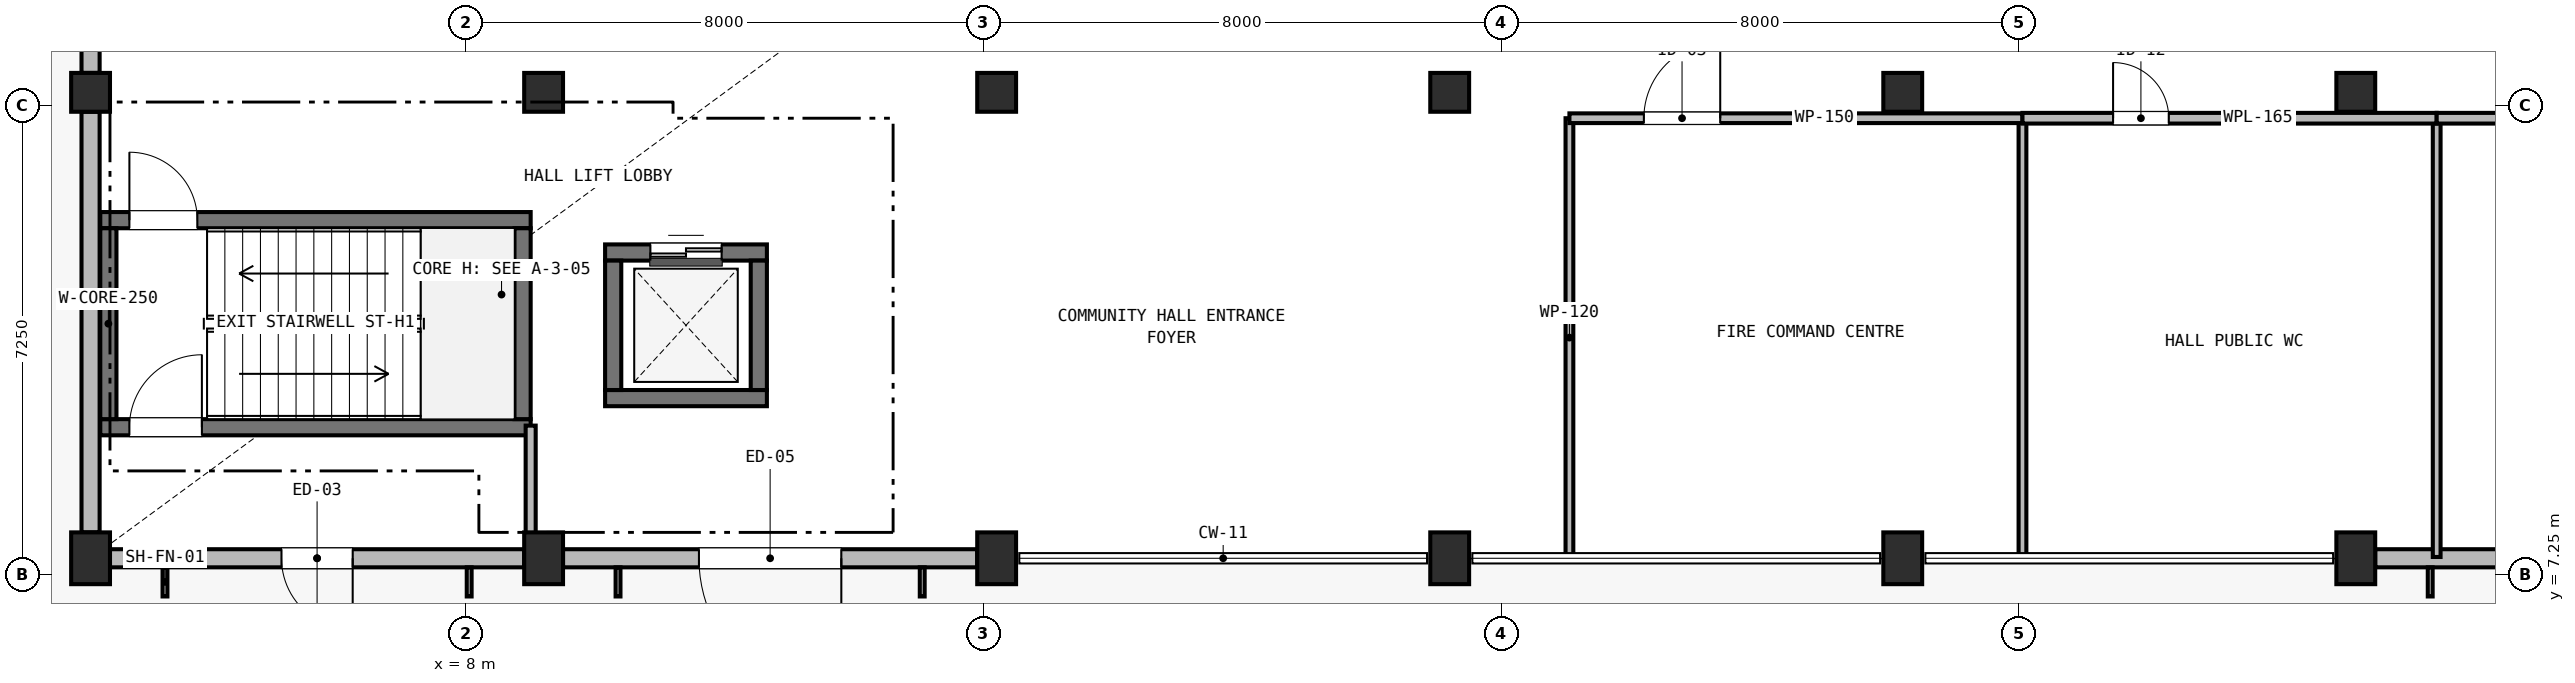
"""IFC4 building model, lengths in metres.
Left out: names, types, materials, properties, quantities, classifications, styles, units other than length and angle.
Written with IfcOpenShell. Run it as: python <this file> out.ifc"""

import sys

from ifc_helpers import new_model, si_unit, direction, frame, frame_2d, origin, origin_2d, place, context, subcontext, project, spatial, rectangle, circle, extrude, element, fill, save


model = new_model("IFC4")
c1 = context("Model", 3, precision=1e-05, world=origin(), true_north=direction((0.0, 1.0)))
c2 = subcontext(c1, "Body", "Model", "MODEL_VIEW")
j1 = project(units=[si_unit("LENGTHUNIT", "METRE"), si_unit("PLANEANGLEUNIT", "RADIAN")], contexts=[c1])
p1 = place(None, origin())
s1 = spatial("IfcSite", under=j1, at=p1, CompositionType="ELEMENT")
p2 = place(p1, origin())
s2 = spatial("IfcBuilding", under=s1, at=p2, CompositionType="ELEMENT")
p3 = place(p2, origin())
s3 = spatial("IfcBuildingStorey", under=s2, at=p3, CompositionType="ELEMENT", Elevation=0.0)
p4 = place(p3, frame((2.2, 7.5, -0.35), z_axis=(0.0, 0.0, 1.0), x_axis=(1.0, 0.0, 0.0)))
e1 = element("IfcColumn", 1, at=p4, inside=s3, PredefinedType="COLUMN", context=c2, shape_type="SweptSolid", body=[
    extrude(rectangle(XDim=0.6, YDim=0.8, at=origin_2d()), origin(), (0.0, 0.0, 1.0), 4.85),
])
p5 = place(p3, frame((2.2, 14.7, -0.35), z_axis=(0.0, 0.0, 1.0), x_axis=(1.0, 0.0, 0.0)))
e2 = element("IfcColumn", 2, at=p5, inside=s3, PredefinedType="COLUMN", context=c2, shape_type="SweptSolid", body=[
    extrude(circle(Radius=0.3, at=origin_2d()), origin(), (0.0, 0.0, 1.0), 4.55),
])
p6 = place(p3, frame((9.2, 7.5, -0.35), z_axis=(0.0, 0.0, 1.0), x_axis=(1.0, 0.0, 0.0)))
e3 = element("IfcColumn", 3, at=p6, inside=s3, PredefinedType="COLUMN", context=c2, shape_type="SweptSolid", body=[
    extrude(rectangle(XDim=0.6, YDim=0.8, at=origin_2d()), origin(), (0.0, 0.0, 1.0), 4.85),
])
p7 = place(p3, frame((9.2, 14.7, -0.35), z_axis=(0.0, 0.0, 1.0), x_axis=(1.0, 0.0, 0.0)))
e4 = element("IfcColumn", 4, at=p7, inside=s3, PredefinedType="COLUMN", context=c2, shape_type="SweptSolid", body=[
    extrude(circle(Radius=0.3, at=origin_2d()), origin(), (0.0, 0.0, 1.0), 4.55),
])
p8 = place(p3, frame((16.2, 7.5, -0.35), z_axis=(0.0, 0.0, 1.0), x_axis=(1.0, 0.0, 0.0)))
e5 = element("IfcColumn", 5, at=p8, inside=s3, PredefinedType="COLUMN", context=c2, shape_type="SweptSolid", body=[
    extrude(rectangle(XDim=0.6, YDim=0.8, at=origin_2d()), origin(), (0.0, 0.0, 1.0), 4.85),
])
p9 = place(p3, frame((16.2, 14.7, -0.35), z_axis=(0.0, 0.0, 1.0), x_axis=(1.0, 0.0, 0.0)))
e6 = element("IfcColumn", 6, at=p9, inside=s3, PredefinedType="COLUMN", context=c2, shape_type="SweptSolid", body=[
    extrude(circle(Radius=0.3, at=origin_2d()), origin(), (0.0, 0.0, 1.0), 4.55),
])
p10 = place(p3, frame((23.2, 7.5, -0.35), z_axis=(0.0, 0.0, 1.0), x_axis=(1.0, 0.0, 0.0)))
e7 = element("IfcColumn", 7, at=p10, inside=s3, PredefinedType="COLUMN", context=c2, shape_type="SweptSolid", body=[
    extrude(rectangle(XDim=0.6, YDim=0.8, at=origin_2d()), origin(), (0.0, 0.0, 1.0), 4.85),
])
p11 = place(p3, frame((23.2, 14.7, -0.35), z_axis=(0.0, 0.0, 1.0), x_axis=(1.0, 0.0, 0.0)))
e8 = element("IfcColumn", 8, at=p11, inside=s3, PredefinedType="COLUMN", context=c2, shape_type="SweptSolid", body=[
    extrude(circle(Radius=0.3, at=origin_2d()), origin(), (0.0, 0.0, 1.0), 4.55),
])
p12 = place(p3, frame((30.2, 7.5, -0.35), z_axis=(0.0, 0.0, 1.0), x_axis=(1.0, 0.0, 0.0)))
e9 = element("IfcColumn", 9, at=p12, inside=s3, PredefinedType="COLUMN", context=c2, shape_type="SweptSolid", body=[
    extrude(rectangle(XDim=0.6, YDim=0.8, at=origin_2d()), origin(), (0.0, 0.0, 1.0), 4.85),
])
p13 = place(p3, frame((30.2, 14.7, -0.35), z_axis=(0.0, 0.0, 1.0), x_axis=(1.0, 0.0, 0.0)))
e10 = element("IfcColumn", 10, at=p13, inside=s3, PredefinedType="COLUMN", context=c2, shape_type="SweptSolid", body=[
    extrude(circle(Radius=0.3, at=origin_2d()), origin(), (0.0, 0.0, 1.0), 4.55),
])
p14 = place(p3, frame((37.2, 7.5, -0.35), z_axis=(0.0, 0.0, 1.0), x_axis=(1.0, 0.0, 0.0)))
e11 = element("IfcColumn", 11, at=p14, inside=s3, PredefinedType="COLUMN", context=c2, shape_type="SweptSolid", body=[
    extrude(rectangle(XDim=0.6, YDim=0.8, at=origin_2d()), origin(), (0.0, 0.0, 1.0), 4.85),
])
p15 = place(p3, frame((37.2, 14.7, -0.35), z_axis=(0.0, 0.0, 1.0), x_axis=(1.0, 0.0, 0.0)))
e12 = element("IfcColumn", 12, at=p15, inside=s3, PredefinedType="COLUMN", context=c2, shape_type="SweptSolid", body=[
    extrude(circle(Radius=0.3, at=origin_2d()), origin(), (0.0, 0.0, 1.0), 4.55),
])
p16 = place(p3, frame((2.35, 12.725, -0.35), z_axis=(0.0, 0.0, 1.0), x_axis=(1.0, 0.0, 0.0)))
e13 = element("IfcWall", 13, at=p16, inside=s3, PredefinedType="SHEAR", context=c2, shape_type="SweptSolid", body=[
    extrude(rectangle(XDim=6.65, YDim=0.25, at=frame_2d((3.325, 0.0))), origin(), (0.0, 0.0, 1.0), 4.85),
])
p17 = place(p16, frame((0.45, 0.0, 0.35)))
e14 = element("IfcOpeningElement", 14, at=p17, cuts=e13, PredefinedType="OPENING", context=c2, shape_type="SweptSolid", body=[
    extrude(rectangle(XDim=1.05, YDim=2.15, at=frame_2d((0.525, 1.075))), frame((0.0, 0.14, 0.0), z_axis=(0.0, -1.0, 0.0), x_axis=(1.0, 0.0, 0.0)), (0.0, 0.0, 1.0), 0.28),
])
p18 = place(p3, frame((2.35, 9.525, -0.35), z_axis=(0.0, 0.0, 1.0), x_axis=(1.0, 0.0, 0.0)))
e15 = element("IfcWall", 15, at=p18, inside=s3, PredefinedType="SHEAR", context=c2, shape_type="SweptSolid", body=[
    extrude(rectangle(XDim=6.65, YDim=0.25, at=frame_2d((3.325, 0.0))), origin(), (0.0, 0.0, 1.0), 4.85),
])
p19 = place(p18, frame((0.45, 0.0, 0.35)))
e16 = element("IfcOpeningElement", 16, at=p19, cuts=e15, PredefinedType="OPENING", context=c2, shape_type="SweptSolid", body=[
    extrude(rectangle(XDim=1.12, YDim=2.15, at=frame_2d((0.56, 1.075))), frame((0.0, 0.14, 0.0), z_axis=(0.0, -1.0, 0.0), x_axis=(1.0, 0.0, 0.0)), (0.0, 0.0, 1.0), 0.28),
])
for number, where, z_axis, x_axis in (
    (17, (2.475, 9.65, -0.35), (0.0, 0.0, 1.0), (0.0, 1.0, 0.0)),
    (18, (8.875, 9.65, -0.35), (0.0, 0.0, 1.0), (0.0, 1.0, 0.0)),
):
    element("IfcWall", number, at=place(p3, frame(where, z_axis=z_axis, x_axis=x_axis)), inside=s3, PredefinedType="SHEAR", context=c2, shape_type="SweptSolid", body=[
        extrude(rectangle(XDim=2.95, YDim=0.25, at=frame_2d((1.475, 0.0))), origin(), (0.0, 0.0, 1.0), 4.85),
    ])
p20 = place(p3, frame((10.15, 12.225, -0.35), z_axis=(0.0, 0.0, 1.0), x_axis=(1.0, 0.0, 0.0)))
e19 = element("IfcWall", 19, at=p20, inside=s3, PredefinedType="SHEAR", context=c2, shape_type="SweptSolid", body=[
    extrude(rectangle(XDim=2.5, YDim=0.25, at=frame_2d((1.25, 0.0))), origin(), (0.0, 0.0, 1.0), 4.85),
])
p21 = place(p20, frame((0.7, 0.0, 0.35)))
e20 = element("IfcOpeningElement", 20, at=p21, cuts=e19, PredefinedType="OPENING", context=c2, shape_type="SweptSolid", body=[
    extrude(rectangle(XDim=1.1, YDim=2.15, at=frame_2d((0.55, 1.075))), frame((0.0, 0.14, 0.0), z_axis=(0.0, -1.0, 0.0), x_axis=(1.0, 0.0, 0.0)), (0.0, 0.0, 1.0), 0.28),
])
p22 = place(p3, frame((10.15, 9.975, -0.35), z_axis=(0.0, 0.0, 1.0), x_axis=(1.0, 0.0, 0.0)))
e21 = element("IfcWall", 21, at=p22, inside=s3, PredefinedType="SHEAR", context=c2, shape_type="SweptSolid", body=[
    extrude(rectangle(XDim=2.5, YDim=0.25, at=frame_2d((1.25, 0.0))), origin(), (0.0, 0.0, 1.0), 4.85),
])
for number, where, z_axis, x_axis in (
    (22, (10.275, 10.1, -0.35), (0.0, 0.0, 1.0), (0.0, 1.0, 0.0)),
    (23, (12.525, 10.1, -0.35), (0.0, 0.0, 1.0), (0.0, 1.0, 0.0)),
):
    element("IfcWall", number, at=place(p3, frame(where, z_axis=z_axis, x_axis=x_axis)), inside=s3, PredefinedType="SHEAR", context=c2, shape_type="SweptSolid", body=[
        extrude(rectangle(XDim=2.0, YDim=0.25, at=frame_2d((1.0, 0.0))), origin(), (0.0, 0.0, 1.0), 4.85),
    ])
p23 = place(p3, frame((8.9, 7.5, 0.0), z_axis=(0.0, 0.0, 1.0), x_axis=(-1.0, 0.0, 0.0)))
e24 = element("IfcWall", 24, at=p23, inside=s3, PredefinedType="SOLIDWALL", context=c2, shape_type="SweptSolid", body=[
    extrude(rectangle(XDim=6.4, YDim=0.28, at=frame_2d((3.2, 0.0))), origin(), (0.0, 0.0, 1.0), 3.65),
])
p24 = place(p23, frame((2.65, 0.0, 0.0)))
e25 = element("IfcOpeningElement", 25, at=p24, cuts=e24, PredefinedType="OPENING", context=c2, shape_type="SweptSolid", body=[
    extrude(rectangle(XDim=1.1, YDim=2.15, at=frame_2d((0.55, 1.075))), frame((0.0, 0.155, 0.0), z_axis=(0.0, -1.0, 0.0), x_axis=(1.0, 0.0, 0.0)), (0.0, 0.0, 1.0), 0.31),
])
p25 = place(p3, frame((15.9, 7.5, 0.0), z_axis=(0.0, 0.0, 1.0), x_axis=(-1.0, 0.0, 0.0)))
e26 = element("IfcWall", 26, at=p25, inside=s3, PredefinedType="SOLIDWALL", context=c2, shape_type="SweptSolid", body=[
    extrude(rectangle(XDim=6.4, YDim=0.28, at=frame_2d((3.2, 0.0))), origin(), (0.0, 0.0, 1.0), 3.65),
])
p26 = place(p25, frame((2.1, 0.0, 0.0)))
e27 = element("IfcOpeningElement", 27, at=p26, cuts=e26, PredefinedType="OPENING", context=c2, shape_type="SweptSolid", body=[
    extrude(rectangle(XDim=2.2, YDim=2.5, at=frame_2d((1.1, 1.25))), frame((0.0, 0.155, 0.0), z_axis=(0.0, -1.0, 0.0), x_axis=(1.0, 0.0, 0.0)), (0.0, 0.0, 1.0), 0.31),
])
p27 = place(p3, frame((43.9, 7.5, 0.0), z_axis=(0.0, 0.0, 1.0), x_axis=(-1.0, 0.0, 0.0)))
e28 = element("IfcWall", 28, at=p27, inside=s3, PredefinedType="SOLIDWALL", context=c2, shape_type="SweptSolid", body=[
    extrude(rectangle(XDim=6.4, YDim=0.28, at=frame_2d((3.2, 0.0))), origin(), (0.0, 0.0, 1.0), 3.65),
])
p28 = place(p27, frame((2.1, 0.0, 0.0)))
e29 = element("IfcOpeningElement", 29, at=p28, cuts=e28, PredefinedType="OPENING", context=c2, shape_type="SweptSolid", body=[
    extrude(rectangle(XDim=2.2, YDim=2.5, at=frame_2d((1.1, 1.25))), frame((0.0, 0.155, 0.0), z_axis=(0.0, -1.0, 0.0), x_axis=(1.0, 0.0, 0.0)), (0.0, 0.0, 1.0), 0.31),
])
p29 = place(p3, frame((2.2, 7.9, 0.0), z_axis=(0.0, 0.0, 1.0), x_axis=(0.0, 1.0, 0.0)))
e30 = element("IfcWall", 30, at=p29, inside=s3, PredefinedType="SOLIDWALL", context=c2, shape_type="SweptSolid", body=[
    extrude(rectangle(XDim=6.5, YDim=0.28, at=frame_2d((3.25, 0.0))), origin(), (0.0, 0.0, 1.0), 3.65),
])
p30 = place(p3, frame((2.2, 15.0, 0.0), z_axis=(0.0, 0.0, 1.0), x_axis=(0.0, 1.0, 0.0)))
e31 = element("IfcWall", 31, at=p30, inside=s3, PredefinedType="SOLIDWALL", context=c2, shape_type="SweptSolid", body=[
    extrude(rectangle(XDim=28.1, YDim=0.28, at=frame_2d((14.05, 0.0))), origin(), (0.0, 0.0, 1.0), 7.38),
])
p31 = place(p30, frame((8.0, 0.0, 0.0)))
e32 = element("IfcOpeningElement", 32, at=p31, cuts=e31, PredefinedType="OPENING", context=c2, shape_type="SweptSolid", body=[
    extrude(rectangle(XDim=3.8, YDim=2.85, at=frame_2d((1.9, 1.425))), frame((0.0, 0.155, 0.0), z_axis=(0.0, -1.0, 0.0), x_axis=(1.0, 0.0, 0.0)), (0.0, 0.0, 1.0), 0.31),
])
p32 = place(p30, frame((2.2, 0.0, 3.2)))
e33 = element("IfcOpeningElement", 33, at=p32, cuts=e31, PredefinedType="OPENING", context=c2, shape_type="SweptSolid", body=[
    extrude(rectangle(XDim=0.64, YDim=2.18, at=frame_2d((0.32, 1.09))), frame((0.0, 0.155, 0.0), z_axis=(0.0, -1.0, 0.0), x_axis=(1.0, 0.0, 0.0)), (0.0, 0.0, 1.0), 0.31),
])
p33 = place(p30, frame((5.2, 0.0, 3.2)))
e34 = element("IfcOpeningElement", 34, at=p33, cuts=e31, PredefinedType="OPENING", context=c2, shape_type="SweptSolid", body=[
    extrude(rectangle(XDim=0.7, YDim=2.36, at=frame_2d((0.35, 1.18))), frame((0.0, 0.155, 0.0), z_axis=(0.0, -1.0, 0.0), x_axis=(1.0, 0.0, 0.0)), (0.0, 0.0, 1.0), 0.31),
])
p34 = place(p30, frame((14.5, 0.0, 3.2)))
e35 = element("IfcOpeningElement", 35, at=p34, cuts=e31, PredefinedType="OPENING", context=c2, shape_type="SweptSolid", body=[
    extrude(rectangle(XDim=0.76, YDim=2.34, at=frame_2d((0.38, 1.17))), frame((0.0, 0.155, 0.0), z_axis=(0.0, -1.0, 0.0), x_axis=(1.0, 0.0, 0.0)), (0.0, 0.0, 1.0), 0.31),
])
p35 = place(p30, frame((19.0, 0.0, 3.2)))
e36 = element("IfcOpeningElement", 36, at=p35, cuts=e31, PredefinedType="OPENING", context=c2, shape_type="SweptSolid", body=[
    extrude(rectangle(XDim=0.82, YDim=2.18, at=frame_2d((0.41, 1.09))), frame((0.0, 0.155, 0.0), z_axis=(0.0, -1.0, 0.0), x_axis=(1.0, 0.0, 0.0)), (0.0, 0.0, 1.0), 0.31),
])
p36 = place(p30, frame((23.5, 0.0, 3.2)))
e37 = element("IfcOpeningElement", 37, at=p36, cuts=e31, PredefinedType="OPENING", context=c2, shape_type="SweptSolid", body=[
    extrude(rectangle(XDim=0.58, YDim=2.16, at=frame_2d((0.29, 1.08))), frame((0.0, 0.155, 0.0), z_axis=(0.0, -1.0, 0.0), x_axis=(1.0, 0.0, 0.0)), (0.0, 0.0, 1.0), 0.31),
])
p37 = place(p3, frame((9.0, 7.65, 0.0), z_axis=(0.0, 0.0, 1.0), x_axis=(0.0, 1.0, 0.0)))
e38 = element("IfcWall", 38, at=p37, inside=s3, PredefinedType="PARTITIONING", context=c2, shape_type="SweptSolid", body=[
    extrude(rectangle(XDim=1.9, YDim=0.155, at=frame_2d((0.95, 0.0))), origin(), (0.0, 0.0, 1.0), 3.667),
])
for number, where, z_axis, x_axis in (
    (39, (25.05, 7.52, 0.0), (0.0, 0.0, 1.0), (0.0, 1.0, 0.0)),
    (40, (32.05, 7.52, 0.0), (0.0, 0.0, 1.0), (0.0, 1.0, 0.0)),
    (41, (38.45, 7.52, 0.0), (0.0, 0.0, 1.0), (0.0, 1.0, 0.0)),
):
    element("IfcWall", number, at=place(p3, frame(where, z_axis=z_axis, x_axis=x_axis)), inside=s3, PredefinedType="PARTITIONING", context=c2, shape_type="SweptSolid", body=[
        extrude(rectangle(XDim=6.78, YDim=0.12, at=frame_2d((3.39, 0.0))), origin(), (0.0, 0.0, 1.0), 4.18),
    ])
p38 = place(p3, frame((25.05, 14.3, 0.0), z_axis=(0.0, 0.0, 1.0), x_axis=(1.0, 0.0, 0.0)))
e42 = element("IfcWall", 42, at=p38, inside=s3, PredefinedType="PARTITIONING", context=c2, shape_type="SweptSolid", body=[
    extrude(rectangle(XDim=7.0, YDim=0.15, at=frame_2d((3.5, 0.0))), origin(), (0.0, 0.0, 1.0), 4.18),
])
p39 = place(p38, frame((1.15, 0.0, 0.0)))
e43 = element("IfcOpeningElement", 43, at=p39, cuts=e42, PredefinedType="OPENING", context=c2, shape_type="SweptSolid", body=[
    extrude(rectangle(XDim=1.18, YDim=2.15, at=frame_2d((0.59, 1.075))), frame((0.0, 0.09, 0.0), z_axis=(0.0, -1.0, 0.0), x_axis=(1.0, 0.0, 0.0)), (0.0, 0.0, 1.0), 0.18),
])
p40 = place(p3, frame((32.05, 14.3, 0.0), z_axis=(0.0, 0.0, 1.0), x_axis=(1.0, 0.0, 0.0)))
e44 = element("IfcWall", 44, at=p40, inside=s3, PredefinedType="PLUMBINGWALL", context=c2, shape_type="SweptSolid", body=[
    extrude(rectangle(XDim=6.4, YDim=0.165, at=frame_2d((3.2, 0.0))), origin(), (0.0, 0.0, 1.0), 4.18),
])
p41 = place(p40, frame((1.4, 0.0, 0.0)))
e45 = element("IfcOpeningElement", 45, at=p41, cuts=e44, PredefinedType="OPENING", context=c2, shape_type="SweptSolid", body=[
    extrude(rectangle(XDim=0.86, YDim=2.1, at=frame_2d((0.43, 1.05))), frame((0.0, 0.097, 0.0), z_axis=(0.0, -1.0, 0.0), x_axis=(1.0, 0.0, 0.0)), (0.0, 0.0, 1.0), 0.195),
])
p42 = place(p3, frame((38.45, 14.3, 0.0), z_axis=(0.0, 0.0, 1.0), x_axis=(1.0, 0.0, 0.0)))
e46 = element("IfcWall", 46, at=p42, inside=s3, PredefinedType="PLUMBINGWALL", context=c2, shape_type="SweptSolid", body=[
    extrude(rectangle(XDim=5.6, YDim=0.165, at=frame_2d((2.8, 0.0))), origin(), (0.0, 0.0, 1.0), 4.18),
])
p43 = place(p42, frame((1.3, 0.0, 0.0)))
e47 = element("IfcOpeningElement", 47, at=p43, cuts=e46, PredefinedType="OPENING", context=c2, shape_type="SweptSolid", body=[
    extrude(rectangle(XDim=0.96, YDim=2.12, at=frame_2d((0.48, 1.06))), frame((0.0, 0.097, 0.0), z_axis=(0.0, -1.0, 0.0), x_axis=(1.0, 0.0, 0.0)), (0.0, 0.0, 1.0), 0.195),
])
p44 = place(p24, origin())
e48 = element("IfcDoor", 48, at=p44, inside=s3, OperationType="SINGLE_SWING_LEFT", PredefinedType="DOOR", context=c2, shape_type="SweptSolid", body=[
    extrude(rectangle(XDim=1.1, YDim=2.15, at=frame_2d((0.55, 1.075))), frame((0.0, 0.025, 0.0), z_axis=(0.0, -1.0, 0.0), x_axis=(1.0, 0.0, 0.0)), (0.0, 0.0, 1.0), 0.05),
])
fill(e25, e48)
p45 = place(p26, origin())
e49 = element("IfcDoor", 49, at=p45, inside=s3, OperationType="DOUBLE_DOOR_SINGLE_SWING", PredefinedType="DOOR", context=c2, shape_type="SweptSolid", body=[
    extrude(rectangle(XDim=2.2, YDim=2.5, at=frame_2d((1.1, 1.25))), frame((0.0, 0.025, 0.0), z_axis=(0.0, -1.0, 0.0), x_axis=(1.0, 0.0, 0.0)), (0.0, 0.0, 1.0), 0.05),
])
fill(e27, e49)
p46 = place(p39, origin())
e50 = element("IfcDoor", 50, at=p46, inside=s3, OperationType="SINGLE_SWING_RIGHT", PredefinedType="DOOR", context=c2, shape_type="SweptSolid", body=[
    extrude(rectangle(XDim=1.18, YDim=2.15, at=frame_2d((0.59, 1.075))), frame((0.0, 0.025, 0.0), z_axis=(0.0, -1.0, 0.0), x_axis=(1.0, 0.0, 0.0)), (0.0, 0.0, 1.0), 0.05),
])
fill(e43, e50)
p47 = place(p41, origin())
e51 = element("IfcDoor", 51, at=p47, inside=s3, OperationType="SINGLE_SWING_LEFT", PredefinedType="DOOR", context=c2, shape_type="SweptSolid", body=[
    extrude(rectangle(XDim=0.86, YDim=2.1, at=frame_2d((0.43, 1.05))), frame((0.0, 0.025, 0.0), z_axis=(0.0, -1.0, 0.0), x_axis=(1.0, 0.0, 0.0)), (0.0, 0.0, 1.0), 0.05),
])
fill(e45, e51)
p48 = place(p17, origin())
e52 = element("IfcDoor", 52, at=p48, inside=s3, OperationType="SINGLE_SWING_LEFT", PredefinedType="DOOR", context=c2, shape_type="SweptSolid", body=[
    extrude(rectangle(XDim=1.05, YDim=2.15, at=frame_2d((0.525, 1.075))), frame((0.0, 0.025, 0.0), z_axis=(0.0, -1.0, 0.0), x_axis=(1.0, 0.0, 0.0)), (0.0, 0.0, 1.0), 0.05),
])
fill(e14, e52)
p49 = place(p19, origin())
e53 = element("IfcDoor", 53, at=p49, inside=s3, OperationType="SINGLE_SWING_RIGHT", PredefinedType="DOOR", context=c2, shape_type="SweptSolid", body=[
    extrude(rectangle(XDim=1.12, YDim=2.15, at=frame_2d((0.56, 1.075))), frame((0.0, 0.025, 0.0), z_axis=(0.0, -1.0, 0.0), x_axis=(1.0, 0.0, 0.0)), (0.0, 0.0, 1.0), 0.05),
])
fill(e16, e53)
p50 = place(p21, origin())
e54 = element("IfcDoor", 54, at=p50, inside=s3, OperationType="DOUBLE_DOOR_SLIDING", PredefinedType="DOOR", context=c2, shape_type="SweptSolid", body=[
    extrude(rectangle(XDim=1.1, YDim=2.15, at=frame_2d((0.55, 1.075))), frame((0.0, 0.025, 0.0), z_axis=(0.0, -1.0, 0.0), x_axis=(1.0, 0.0, 0.0)), (0.0, 0.0, 1.0), 0.05),
])
fill(e20, e54)
save(model, sys.argv[1])
